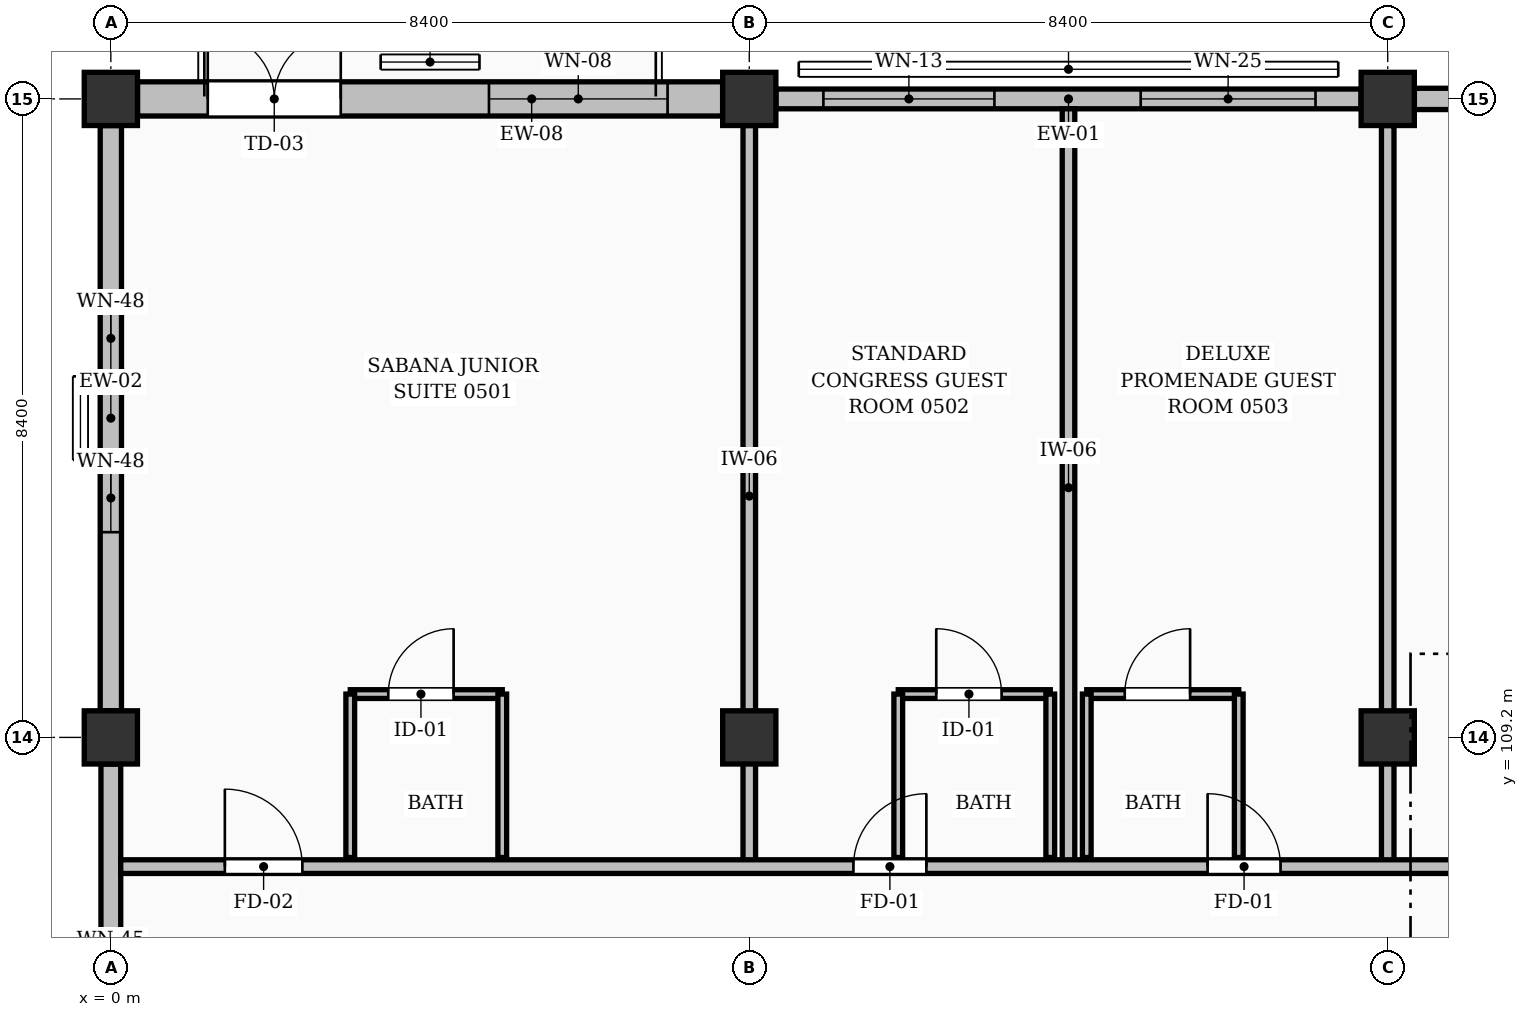
"""IFC4 building model, lengths in metres.
Left out: names, types, materials, properties, quantities, classifications, styles, units other than length and angle.
Written with IfcOpenShell. Run it as: python <this file> out.ifc"""

import sys

from ifc_helpers import new_model, si_unit, direction, frame, frame_2d, origin, origin_2d, place, context, subcontext, project, spatial, rectangle, extrude, element, fill, save


model = new_model("IFC4")
c1 = context("Model", 3, precision=1e-05, world=origin(), true_north=direction((0.0, 1.0)))
c2 = subcontext(c1, "Body", "Model", "MODEL_VIEW")
j1 = project(units=[si_unit("LENGTHUNIT", "METRE"), si_unit("PLANEANGLEUNIT", "RADIAN")], contexts=[c1])
p1 = place(None, origin())
s1 = spatial("IfcSite", under=j1, at=p1, CompositionType="ELEMENT")
p2 = place(p1, origin())
s2 = spatial("IfcBuilding", under=s1, at=p2, CompositionType="ELEMENT")
p3 = place(p2, frame((0.0, 0.0, 18.48)))
s3 = spatial("IfcBuildingStorey", under=s2, at=p3, CompositionType="ELEMENT", Elevation=18.48)
for number, where, z_axis, x_axis in (
    (1, (0.0, 109.2, 0.0), (0.0, 0.0, 1.0), (1.0, 0.0, 0.0)),
    (2, (0.0, 117.6, 0.0), (0.0, 0.0, 1.0), (1.0, 0.0, 0.0)),
    (3, (8.4, 109.2, 0.0), (0.0, 0.0, 1.0), (1.0, 0.0, 0.0)),
    (4, (8.4, 117.6, 0.0), (0.0, 0.0, 1.0), (1.0, 0.0, 0.0)),
    (5, (16.8, 109.2, 0.0), (0.0, 0.0, 1.0), (1.0, 0.0, 0.0)),
    (6, (16.8, 117.6, 0.0), (0.0, 0.0, 1.0), (1.0, 0.0, 0.0)),
):
    element("IfcColumn", number, at=place(p3, frame(where, z_axis=z_axis, x_axis=x_axis)), inside=s3, PredefinedType="COLUMN", context=c2, shape_type="SweptSolid", body=[
        extrude(rectangle(XDim=0.7, YDim=0.7, at=origin_2d()), origin(), (0.0, 0.0, 1.0), 3.36),
    ])
p4 = place(p3, frame((0.351, 117.6, 0.0), z_axis=(0.0, 0.0, 1.0), x_axis=(1.0, 0.0, 0.0)))
e7 = element("IfcWall", 7, at=p4, inside=s3, PredefinedType="SOLIDWALL", context=c2, shape_type="SweptSolid", body=[
    extrude(rectangle(XDim=7.698, YDim=0.45, at=frame_2d((3.849, 0.0))), origin(), (0.0, 0.0, 1.0), 2.494),
])
p5 = place(p4, frame((0.924, 0.0, 0.0)))
e8 = element("IfcOpeningElement", 8, at=p5, cuts=e7, PredefinedType="OPENING", context=c2, shape_type="SweptSolid", body=[
    extrude(rectangle(XDim=1.75, YDim=2.08, at=frame_2d((0.875, 1.04))), frame((0.0, 0.235, 0.0), z_axis=(0.0, -1.0, 0.0), x_axis=(1.0, 0.0, 0.0)), (0.0, 0.0, 1.0), 0.47),
])
p6 = place(p4, frame((4.624, 0.0, 0.25)))
e9 = element("IfcOpeningElement", 9, at=p6, cuts=e7, PredefinedType="OPENING", context=c2, shape_type="SweptSolid", body=[
    extrude(rectangle(XDim=2.35, YDim=1.95, at=frame_2d((1.175, 0.975))), frame((0.0, 0.235, 0.0), z_axis=(0.0, -1.0, 0.0), x_axis=(1.0, 0.0, 0.0)), (0.0, 0.0, 1.0), 0.47),
])
p7 = place(p3, frame((8.751, 117.6, 0.0), z_axis=(0.0, 0.0, 1.0), x_axis=(1.0, 0.0, 0.0)))
e10 = element("IfcWall", 10, at=p7, inside=s3, PredefinedType="SOLIDWALL", context=c2, shape_type="SweptSolid", body=[
    extrude(rectangle(XDim=7.698, YDim=0.26, at=frame_2d((3.849, 0.0))), origin(), (0.0, 0.0, 1.0), 2.494),
])
p8 = place(p7, frame((0.624, 0.0, 0.25)))
e11 = element("IfcOpeningElement", 11, at=p8, cuts=e10, PredefinedType="OPENING", context=c2, shape_type="SweptSolid", body=[
    extrude(rectangle(XDim=2.25, YDim=2.05, at=frame_2d((1.125, 1.025))), frame((0.0, 0.14, 0.0), z_axis=(0.0, -1.0, 0.0), x_axis=(1.0, 0.0, 0.0)), (0.0, 0.0, 1.0), 0.28),
])
p9 = place(p7, frame((4.799, 0.0, 0.25)))
e12 = element("IfcOpeningElement", 12, at=p9, cuts=e10, PredefinedType="OPENING", context=c2, shape_type="SweptSolid", body=[
    extrude(rectangle(XDim=2.3, YDim=1.75, at=frame_2d((1.15, 0.875))), frame((0.0, 0.14, 0.0), z_axis=(0.0, -1.0, 0.0), x_axis=(1.0, 0.0, 0.0)), (0.0, 0.0, 1.0), 0.28),
])
p10 = place(p3, frame((17.151, 117.6, 0.0), z_axis=(0.0, 0.0, 1.0), x_axis=(1.0, 0.0, 0.0)))
e13 = element("IfcWall", 13, at=p10, inside=s3, PredefinedType="SOLIDWALL", context=c2, shape_type="SweptSolid", body=[
    extrude(rectangle(XDim=7.698, YDim=0.28, at=frame_2d((3.849, 0.0))), origin(), (0.0, 0.0, 1.0), 2.494),
])
p11 = place(p10, frame((1.024, 0.0, 0.0)))
e14 = element("IfcOpeningElement", 14, at=p11, cuts=e13, PredefinedType="OPENING", context=c2, shape_type="SweptSolid", body=[
    extrude(rectangle(XDim=1.55, YDim=2.08, at=frame_2d((0.775, 1.04))), frame((0.0, 0.15, 0.0), z_axis=(0.0, -1.0, 0.0), x_axis=(1.0, 0.0, 0.0)), (0.0, 0.0, 1.0), 0.3),
])
p12 = place(p10, frame((4.649, 0.0, 0.25)))
e15 = element("IfcOpeningElement", 15, at=p12, cuts=e13, PredefinedType="OPENING", context=c2, shape_type="SweptSolid", body=[
    extrude(rectangle(XDim=2.3, YDim=1.75, at=frame_2d((1.15, 0.875))), frame((0.0, 0.15, 0.0), z_axis=(0.0, -1.0, 0.0), x_axis=(1.0, 0.0, 0.0)), (0.0, 0.0, 1.0), 0.3),
])
p13 = place(p3, frame((0.0, 101.151, 0.0), z_axis=(0.0, 0.0, 1.0), x_axis=(0.0, 1.0, 0.0)))
e16 = element("IfcWall", 16, at=p13, inside=s3, PredefinedType="SOLIDWALL", context=c2, shape_type="SweptSolid", body=[
    extrude(rectangle(XDim=7.698, YDim=0.26, at=frame_2d((3.849, 0.0))), origin(), (0.0, 0.0, 1.0), 2.494),
])
p14 = place(p13, frame((2.439, 0.0, 0.3)))
e17 = element("IfcOpeningElement", 17, at=p14, cuts=e16, PredefinedType="OPENING", context=c2, shape_type="SweptSolid", body=[
    extrude(rectangle(XDim=0.72, YDim=1.85, at=frame_2d((0.36, 0.925))), frame((0.0, 0.14, 0.0), z_axis=(0.0, -1.0, 0.0), x_axis=(1.0, 0.0, 0.0)), (0.0, 0.0, 1.0), 0.28),
])
p15 = place(p13, frame((4.539, 0.0, 0.3)))
e18 = element("IfcOpeningElement", 18, at=p15, cuts=e16, PredefinedType="OPENING", context=c2, shape_type="SweptSolid", body=[
    extrude(rectangle(XDim=0.72, YDim=1.85, at=frame_2d((0.36, 0.925))), frame((0.0, 0.14, 0.0), z_axis=(0.0, -1.0, 0.0), x_axis=(1.0, 0.0, 0.0)), (0.0, 0.0, 1.0), 0.28),
])
p16 = place(p3, frame((0.0, 109.551, 0.0), z_axis=(0.0, 0.0, 1.0), x_axis=(0.0, 1.0, 0.0)))
e19 = element("IfcWall", 19, at=p16, inside=s3, PredefinedType="SOLIDWALL", context=c2, shape_type="SweptSolid", body=[
    extrude(rectangle(XDim=7.698, YDim=0.28, at=frame_2d((3.849, 0.0))), origin(), (0.0, 0.0, 1.0), 2.494),
])
p17 = place(p16, frame((2.349, 0.0, 0.3)))
e20 = element("IfcOpeningElement", 20, at=p17, cuts=e19, PredefinedType="OPENING", context=c2, shape_type="SweptSolid", body=[
    extrude(rectangle(XDim=0.9, YDim=1.85, at=frame_2d((0.45, 0.925))), frame((0.0, 0.15, 0.0), z_axis=(0.0, -1.0, 0.0), x_axis=(1.0, 0.0, 0.0)), (0.0, 0.0, 1.0), 0.3),
])
p18 = place(p16, frame((4.449, 0.0, 0.3)))
e21 = element("IfcOpeningElement", 21, at=p18, cuts=e19, PredefinedType="OPENING", context=c2, shape_type="SweptSolid", body=[
    extrude(rectangle(XDim=0.9, YDim=1.85, at=frame_2d((0.45, 0.925))), frame((0.0, 0.15, 0.0), z_axis=(0.0, -1.0, 0.0), x_axis=(1.0, 0.0, 0.0)), (0.0, 0.0, 1.0), 0.3),
])
p19 = place(p3, frame((3.15, 109.77, 0.0), z_axis=(0.0, 0.0, 1.0), x_axis=(1.0, 0.0, 0.0)))
e22 = element("IfcWall", 22, at=p19, inside=s3, PredefinedType="PARTITIONING", context=c2, shape_type="SweptSolid", body=[
    extrude(rectangle(XDim=2.0, YDim=0.115, at=frame_2d((1.0, 0.0))), origin(), (0.0, 0.0, 1.0), 3.12),
])
p20 = place(p19, frame((0.5, 0.0, 0.0)))
e23 = element("IfcOpeningElement", 23, at=p20, cuts=e22, PredefinedType="OPENING", context=c2, shape_type="SweptSolid", body=[
    extrude(rectangle(XDim=0.86, YDim=2.05, at=frame_2d((0.43, 1.025))), frame((0.0, 0.067, 0.0), z_axis=(0.0, -1.0, 0.0), x_axis=(1.0, 0.0, 0.0)), (0.0, 0.0, 1.0), 0.135),
])
for number, where, z_axis, x_axis in (
    (24, (3.15, 107.62, 0.0), (0.0, 0.0, 1.0), (0.0, 1.0, 0.0)),
    (25, (5.15, 107.62, 0.0), (0.0, 0.0, 1.0), (0.0, 1.0, 0.0)),
):
    element("IfcWall", number, at=place(p3, frame(where, z_axis=z_axis, x_axis=x_axis)), inside=s3, PredefinedType="PARTITIONING", context=c2, shape_type="SweptSolid", body=[
        extrude(rectangle(XDim=2.15, YDim=0.115, at=frame_2d((1.075, 0.0))), origin(), (0.0, 0.0, 1.0), 3.12),
    ])
p21 = place(p3, frame((10.36, 109.77, 0.0), z_axis=(0.0, 0.0, 1.0), x_axis=(1.0, 0.0, 0.0)))
e26 = element("IfcWall", 26, at=p21, inside=s3, PredefinedType="PARTITIONING", context=c2, shape_type="SweptSolid", body=[
    extrude(rectangle(XDim=2.0, YDim=0.115, at=frame_2d((1.0, 0.0))), origin(), (0.0, 0.0, 1.0), 3.12),
])
p22 = place(p21, frame((0.5, 0.0, 0.0)))
e27 = element("IfcOpeningElement", 27, at=p22, cuts=e26, PredefinedType="OPENING", context=c2, shape_type="SweptSolid", body=[
    extrude(rectangle(XDim=0.86, YDim=2.05, at=frame_2d((0.43, 1.025))), frame((0.0, 0.067, 0.0), z_axis=(0.0, -1.0, 0.0), x_axis=(1.0, 0.0, 0.0)), (0.0, 0.0, 1.0), 0.135),
])
p23 = place(p3, frame((10.36, 107.62, 0.0), z_axis=(0.0, 0.0, 1.0), x_axis=(0.0, 1.0, 0.0)))
e28 = element("IfcWall", 28, at=p23, inside=s3, PredefinedType="PARTITIONING", context=c2, shape_type="SweptSolid", body=[
    extrude(rectangle(XDim=2.15, YDim=0.115, at=frame_2d((1.075, 0.0))), origin(), (0.0, 0.0, 1.0), 2.642),
])
p24 = place(p3, frame((12.36, 107.62, 0.0), z_axis=(0.0, 0.0, 1.0), x_axis=(0.0, 1.0, 0.0)))
e29 = element("IfcWall", 29, at=p24, inside=s3, PredefinedType="PARTITIONING", context=c2, shape_type="SweptSolid", body=[
    extrude(rectangle(XDim=2.15, YDim=0.115, at=frame_2d((1.075, 0.0))), origin(), (0.0, 0.0, 1.0), 3.12),
])
p25 = place(p3, frame((12.84, 109.77, 0.0), z_axis=(0.0, 0.0, 1.0), x_axis=(1.0, 0.0, 0.0)))
e30 = element("IfcWall", 30, at=p25, inside=s3, PredefinedType="PARTITIONING", context=c2, shape_type="SweptSolid", body=[
    extrude(rectangle(XDim=2.0, YDim=0.115, at=frame_2d((1.0, 0.0))), origin(), (0.0, 0.0, 1.0), 3.12),
])
p26 = place(p25, frame((0.5, 0.0, 0.0)))
e31 = element("IfcOpeningElement", 31, at=p26, cuts=e30, PredefinedType="OPENING", context=c2, shape_type="SweptSolid", body=[
    extrude(rectangle(XDim=0.86, YDim=2.05, at=frame_2d((0.43, 1.025))), frame((0.0, 0.067, 0.0), z_axis=(0.0, -1.0, 0.0), x_axis=(1.0, 0.0, 0.0)), (0.0, 0.0, 1.0), 0.135),
])
p27 = place(p3, frame((12.84, 107.62, 0.0), z_axis=(0.0, 0.0, 1.0), x_axis=(0.0, 1.0, 0.0)))
e32 = element("IfcWall", 32, at=p27, inside=s3, PredefinedType="PARTITIONING", context=c2, shape_type="SweptSolid", body=[
    extrude(rectangle(XDim=2.15, YDim=0.115, at=frame_2d((1.075, 0.0))), origin(), (0.0, 0.0, 1.0), 3.12),
])
p28 = place(p3, frame((14.84, 107.62, 0.0), z_axis=(0.0, 0.0, 1.0), x_axis=(0.0, 1.0, 0.0)))
e33 = element("IfcWall", 33, at=p28, inside=s3, PredefinedType="PARTITIONING", context=c2, shape_type="SweptSolid", body=[
    extrude(rectangle(XDim=2.15, YDim=0.115, at=frame_2d((1.075, 0.0))), origin(), (0.0, 0.0, 1.0), 2.642),
])
p29 = place(p3, frame((12.6, 107.5, 0.0), z_axis=(0.0, 0.0, 1.0), x_axis=(0.0, 1.0, 0.0)))
e34 = element("IfcWall", 34, at=p29, inside=s3, PredefinedType="PARTITIONING", context=c2, shape_type="SweptSolid", body=[
    extrude(rectangle(XDim=9.97, YDim=0.165, at=frame_2d((4.985, 0.0))), origin(), (0.0, 0.0, 1.0), 3.12),
])
for number, where, z_axis, x_axis in (
    (35, (8.4, 107.5, 0.0), (0.0, 0.0, 1.0), (0.0, 1.0, 0.0)),
    (36, (16.8, 107.5, 0.0), (0.0, 0.0, 1.0), (0.0, 1.0, 0.0)),
):
    element("IfcWall", number, at=place(p3, frame(where, z_axis=z_axis, x_axis=x_axis)), inside=s3, PredefinedType="PARTITIONING", context=c2, shape_type="SweptSolid", body=[
        extrude(rectangle(XDim=9.75, YDim=0.165, at=frame_2d((4.875, 0.0))), origin(), (0.0, 0.0, 1.0), 2.455),
    ])
p30 = place(p3, frame((0.13, 107.5, 0.0), z_axis=(0.0, 0.0, 1.0), x_axis=(1.0, 0.0, 0.0)))
e37 = element("IfcWall", 37, at=p30, inside=s3, PredefinedType="PARTITIONING", context=c2, shape_type="SweptSolid", body=[
    extrude(rectangle(XDim=34.24, YDim=0.18, at=frame_2d((17.12, 0.0))), origin(), (0.0, 0.0, 1.0), 3.12),
])
p31 = place(p30, frame((1.37, 0.0, 0.0)))
e38 = element("IfcOpeningElement", 38, at=p31, cuts=e37, PredefinedType="OPENING", context=c2, shape_type="SweptSolid", body=[
    extrude(rectangle(XDim=1.02, YDim=2.15, at=frame_2d((0.51, 1.075))), frame((0.0, 0.1, 0.0), z_axis=(0.0, -1.0, 0.0), x_axis=(1.0, 0.0, 0.0)), (0.0, 0.0, 1.0), 0.2),
])
p32 = place(p30, frame((9.64, 0.0, 0.0)))
e39 = element("IfcOpeningElement", 39, at=p32, cuts=e37, PredefinedType="OPENING", context=c2, shape_type="SweptSolid", body=[
    extrude(rectangle(XDim=0.96, YDim=2.15, at=frame_2d((0.48, 1.075))), frame((0.0, 0.1, 0.0), z_axis=(0.0, -1.0, 0.0), x_axis=(1.0, 0.0, 0.0)), (0.0, 0.0, 1.0), 0.2),
])
p33 = place(p30, frame((14.3, 0.0, 0.0)))
e40 = element("IfcOpeningElement", 40, at=p33, cuts=e37, PredefinedType="OPENING", context=c2, shape_type="SweptSolid", body=[
    extrude(rectangle(XDim=0.96, YDim=2.15, at=frame_2d((0.48, 1.075))), frame((0.0, 0.1, 0.0), z_axis=(0.0, -1.0, 0.0), x_axis=(1.0, 0.0, 0.0)), (0.0, 0.0, 1.0), 0.2),
])
p34 = place(p30, frame((18.17, 0.0, 0.0)))
e41 = element("IfcOpeningElement", 41, at=p34, cuts=e37, PredefinedType="OPENING", context=c2, shape_type="SweptSolid", body=[
    extrude(rectangle(XDim=1.02, YDim=2.15, at=frame_2d((0.51, 1.075))), frame((0.0, 0.1, 0.0), z_axis=(0.0, -1.0, 0.0), x_axis=(1.0, 0.0, 0.0)), (0.0, 0.0, 1.0), 0.2),
])
p35 = place(p30, frame((26.44, 0.0, 0.0)))
e42 = element("IfcOpeningElement", 42, at=p35, cuts=e37, PredefinedType="OPENING", context=c2, shape_type="SweptSolid", body=[
    extrude(rectangle(XDim=0.96, YDim=2.15, at=frame_2d((0.48, 1.075))), frame((0.0, 0.1, 0.0), z_axis=(0.0, -1.0, 0.0), x_axis=(1.0, 0.0, 0.0)), (0.0, 0.0, 1.0), 0.2),
])
p36 = place(p30, frame((31.1, 0.0, 0.0)))
e43 = element("IfcOpeningElement", 43, at=p36, cuts=e37, PredefinedType="OPENING", context=c2, shape_type="SweptSolid", body=[
    extrude(rectangle(XDim=0.96, YDim=2.15, at=frame_2d((0.48, 1.075))), frame((0.0, 0.1, 0.0), z_axis=(0.0, -1.0, 0.0), x_axis=(1.0, 0.0, 0.0)), (0.0, 0.0, 1.0), 0.2),
])
p37 = place(p5, origin())
e44 = element("IfcDoor", 44, at=p37, inside=s3, OperationType="DOUBLE_DOOR_SINGLE_SWING", PredefinedType="DOOR", context=c2, shape_type="SweptSolid", body=[
    extrude(rectangle(XDim=1.75, YDim=2.08, at=frame_2d((0.875, 1.04))), frame((0.0, 0.025, 0.0), z_axis=(0.0, -1.0, 0.0), x_axis=(1.0, 0.0, 0.0)), (0.0, 0.0, 1.0), 0.05),
])
fill(e8, e44)
p38 = place(p6, origin())
e45 = element("IfcWindow", 45, at=p38, inside=s3, PartitioningType="DOUBLE_PANEL_VERTICAL", PredefinedType="WINDOW", context=c2, shape_type="SweptSolid", body=[
    extrude(rectangle(XDim=2.35, YDim=1.95, at=frame_2d((1.175, 0.975))), frame((0.0, 0.03, 0.0), z_axis=(0.0, -1.0, 0.0), x_axis=(1.0, 0.0, 0.0)), (0.0, 0.0, 1.0), 0.06),
])
fill(e9, e45)
p39 = place(p8, origin())
e46 = element("IfcWindow", 46, at=p39, inside=s3, PartitioningType="DOUBLE_PANEL_VERTICAL", PredefinedType="WINDOW", context=c2, shape_type="SweptSolid", body=[
    extrude(rectangle(XDim=2.25, YDim=2.05, at=frame_2d((1.125, 1.025))), frame((0.0, 0.03, 0.0), z_axis=(0.0, -1.0, 0.0), x_axis=(1.0, 0.0, 0.0)), (0.0, 0.0, 1.0), 0.06),
])
fill(e11, e46)
p40 = place(p9, origin())
e47 = element("IfcWindow", 47, at=p40, inside=s3, PartitioningType="DOUBLE_PANEL_VERTICAL", PredefinedType="WINDOW", context=c2, shape_type="SweptSolid", body=[
    extrude(rectangle(XDim=2.3, YDim=1.75, at=frame_2d((1.15, 0.875))), frame((0.0, 0.03, 0.0), z_axis=(0.0, -1.0, 0.0), x_axis=(1.0, 0.0, 0.0)), (0.0, 0.0, 1.0), 0.06),
])
fill(e12, e47)
p41 = place(p17, origin())
e48 = element("IfcWindow", 48, at=p41, inside=s3, PartitioningType="SINGLE_PANEL", PredefinedType="WINDOW", context=c2, shape_type="SweptSolid", body=[
    extrude(rectangle(XDim=0.9, YDim=1.85, at=frame_2d((0.45, 0.925))), frame((0.0, 0.03, 0.0), z_axis=(0.0, -1.0, 0.0), x_axis=(1.0, 0.0, 0.0)), (0.0, 0.0, 1.0), 0.06),
])
fill(e20, e48)
p42 = place(p18, origin())
e49 = element("IfcWindow", 49, at=p42, inside=s3, PartitioningType="SINGLE_PANEL", PredefinedType="WINDOW", context=c2, shape_type="SweptSolid", body=[
    extrude(rectangle(XDim=0.9, YDim=1.85, at=frame_2d((0.45, 0.925))), frame((0.0, 0.03, 0.0), z_axis=(0.0, -1.0, 0.0), x_axis=(1.0, 0.0, 0.0)), (0.0, 0.0, 1.0), 0.06),
])
fill(e21, e49)
p43 = place(p20, origin())
e50 = element("IfcDoor", 50, at=p43, inside=s3, OperationType="SINGLE_SWING_RIGHT", PredefinedType="DOOR", context=c2, shape_type="SweptSolid", body=[
    extrude(rectangle(XDim=0.86, YDim=2.05, at=frame_2d((0.43, 1.025))), frame((0.0, 0.025, 0.0), z_axis=(0.0, -1.0, 0.0), x_axis=(1.0, 0.0, 0.0)), (0.0, 0.0, 1.0), 0.05),
])
fill(e23, e50)
p44 = place(p22, origin())
e51 = element("IfcDoor", 51, at=p44, inside=s3, OperationType="SINGLE_SWING_LEFT", PredefinedType="DOOR", context=c2, shape_type="SweptSolid", body=[
    extrude(rectangle(XDim=0.86, YDim=2.05, at=frame_2d((0.43, 1.025))), frame((0.0, 0.025, 0.0), z_axis=(0.0, -1.0, 0.0), x_axis=(1.0, 0.0, 0.0)), (0.0, 0.0, 1.0), 0.05),
])
fill(e27, e51)
p45 = place(p26, origin())
e52 = element("IfcDoor", 52, at=p45, inside=s3, OperationType="SINGLE_SWING_RIGHT", PredefinedType="DOOR", context=c2, shape_type="SweptSolid", body=[
    extrude(rectangle(XDim=0.86, YDim=2.05, at=frame_2d((0.43, 1.025))), frame((0.0, 0.025, 0.0), z_axis=(0.0, -1.0, 0.0), x_axis=(1.0, 0.0, 0.0)), (0.0, 0.0, 1.0), 0.05),
])
fill(e31, e52)
p46 = place(p31, origin())
e53 = element("IfcDoor", 53, at=p46, inside=s3, OperationType="SINGLE_SWING_LEFT", PredefinedType="DOOR", context=c2, shape_type="SweptSolid", body=[
    extrude(rectangle(XDim=1.02, YDim=2.15, at=frame_2d((0.51, 1.075))), frame((0.0, 0.025, 0.0), z_axis=(0.0, -1.0, 0.0), x_axis=(1.0, 0.0, 0.0)), (0.0, 0.0, 1.0), 0.05),
])
fill(e38, e53)
p47 = place(p32, origin())
e54 = element("IfcDoor", 54, at=p47, inside=s3, OperationType="SINGLE_SWING_RIGHT", PredefinedType="DOOR", context=c2, shape_type="SweptSolid", body=[
    extrude(rectangle(XDim=0.96, YDim=2.15, at=frame_2d((0.48, 1.075))), frame((0.0, 0.025, 0.0), z_axis=(0.0, -1.0, 0.0), x_axis=(1.0, 0.0, 0.0)), (0.0, 0.0, 1.0), 0.05),
])
fill(e39, e54)
p48 = place(p33, origin())
e55 = element("IfcDoor", 55, at=p48, inside=s3, OperationType="SINGLE_SWING_LEFT", PredefinedType="DOOR", context=c2, shape_type="SweptSolid", body=[
    extrude(rectangle(XDim=0.96, YDim=2.15, at=frame_2d((0.48, 1.075))), frame((0.0, 0.025, 0.0), z_axis=(0.0, -1.0, 0.0), x_axis=(1.0, 0.0, 0.0)), (0.0, 0.0, 1.0), 0.05),
])
fill(e40, e55)
save(model, sys.argv[1])
